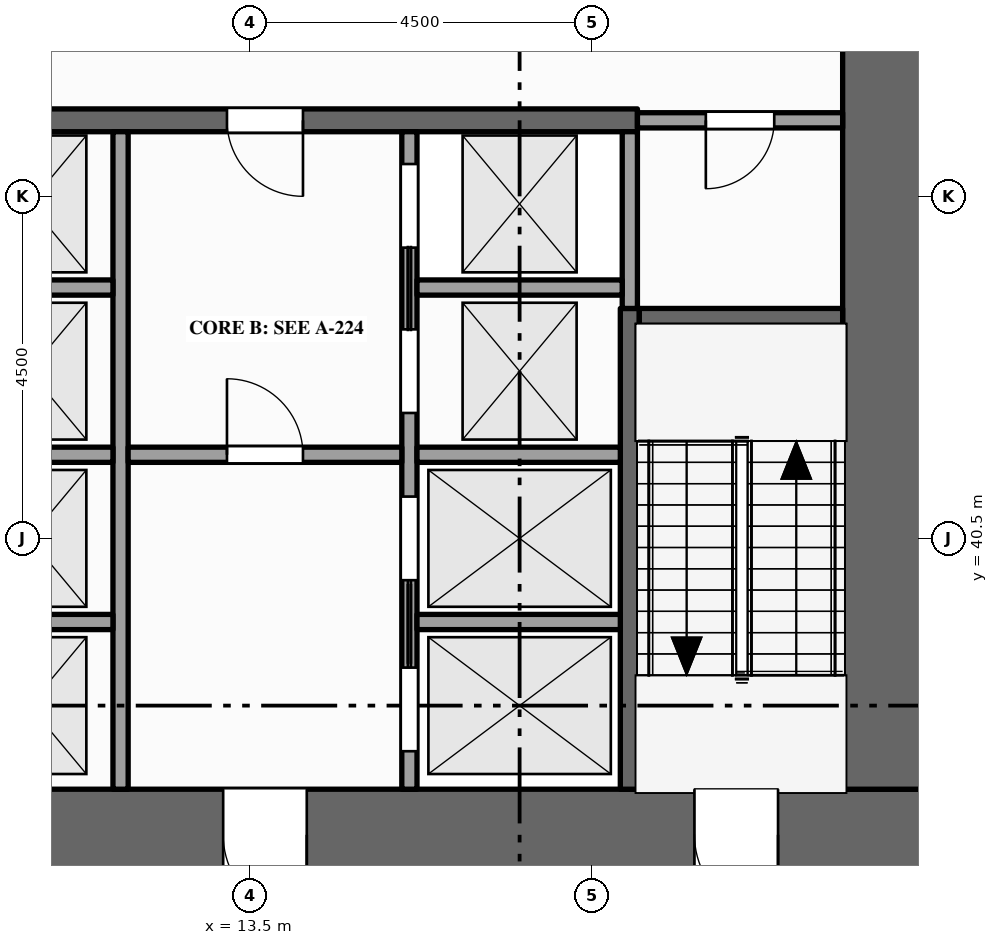
"""IFC4 building model, lengths in metres.
Left out: names, types, materials, properties, quantities, classifications, styles, units other than length and angle.
Written with IfcOpenShell. Run it as: python <this file> out.ifc"""

import sys

from ifc_helpers import new_model, si_unit, direction, frame, frame_2d, origin, place, context, subcontext, project, spatial, rectangle, extrude, element, fill, save


model = new_model("IFC4")
c1 = context("Model", 3, precision=1e-05, world=origin(), true_north=direction((0.0, 1.0)))
c2 = subcontext(c1, "Body", "Model", "MODEL_VIEW")
j1 = project(units=[si_unit("LENGTHUNIT", "METRE"), si_unit("PLANEANGLEUNIT", "RADIAN")], contexts=[c1])
p1 = place(None, origin())
s1 = spatial("IfcSite", under=j1, at=p1, CompositionType="ELEMENT")
p2 = place(p1, origin())
s2 = spatial("IfcBuilding", under=s1, at=p2, CompositionType="ELEMENT")
p3 = place(p2, frame((0.0, 0.0, 131.0)))
s3 = spatial("IfcBuildingStorey", under=s2, at=p3, CompositionType="ELEMENT", Elevation=131.0)
p4 = place(p3, frame((0.0, 36.6, -0.15), z_axis=(0.0, 0.0, 1.0), x_axis=(1.0, 0.0, 0.0)))
e1 = element("IfcWall", 1, at=p4, inside=s3, PredefinedType="SHEAR", context=c2, shape_type="SweptSolid", body=[
    extrude(rectangle(XDim=22.5, YDim=1.2, at=frame_2d((11.25, 0.0))), origin(), (0.0, 0.0, 1.0), 8.0),
])
p5 = place(p4, frame((7.1, 0.0, 0.15)))
e2 = element("IfcOpeningElement", 2, at=p5, cuts=e1, PredefinedType="OPENING", context=c2, shape_type="SweptSolid", body=[
    extrude(rectangle(XDim=1.8, YDim=2.1, at=frame_2d((0.9, 1.05))), frame((0.0, 0.61, 0.0), z_axis=(0.0, -1.0, 0.0), x_axis=(1.0, 0.0, 0.0)), (0.0, 0.0, 1.0), 1.22),
])
p6 = place(p4, frame((13.15, 0.0, 0.15)))
e3 = element("IfcOpeningElement", 3, at=p6, cuts=e1, PredefinedType="OPENING", context=c2, shape_type="SweptSolid", body=[
    extrude(rectangle(XDim=1.1, YDim=2.1, at=frame_2d((0.55, 1.05))), frame((0.0, 0.61, 0.0), z_axis=(0.0, -1.0, 0.0), x_axis=(1.0, 0.0, 0.0)), (0.0, 0.0, 1.0), 1.22),
])
p7 = place(p4, frame((2.15, 0.0, 0.15)))
e4 = element("IfcOpeningElement", 4, at=p7, cuts=e1, PredefinedType="OPENING", context=c2, shape_type="SweptSolid", body=[
    extrude(rectangle(XDim=1.1, YDim=2.1, at=frame_2d((0.55, 1.05))), frame((0.0, 0.61, 0.0), z_axis=(0.0, -1.0, 0.0), x_axis=(1.0, 0.0, 0.0)), (0.0, 0.0, 1.0), 1.22),
])
p8 = place(p4, frame((19.35, 0.0, 0.15)))
e5 = element("IfcOpeningElement", 5, at=p8, cuts=e1, PredefinedType="OPENING", context=c2, shape_type="SweptSolid", body=[
    extrude(rectangle(XDim=1.1, YDim=2.1, at=frame_2d((0.55, 1.05))), frame((0.0, 0.61, 0.0), z_axis=(0.0, -1.0, 0.0), x_axis=(1.0, 0.0, 0.0)), (0.0, 0.0, 1.0), 1.22),
])
p9 = place(p3, frame((21.9, 37.2, -0.15), z_axis=(0.0, 0.0, 1.0), x_axis=(0.0, 1.0, 0.0)))
e6 = element("IfcWall", 6, at=p9, inside=s3, PredefinedType="SHEAR", context=c2, shape_type="SweptSolid", body=[
    extrude(rectangle(XDim=11.1, YDim=1.2, at=frame_2d((5.55, 0.0))), origin(), (0.0, 0.0, 1.0), 8.0),
])
p10 = place(p3, frame((11.8, 37.2, 0.0), z_axis=(0.0, 0.0, 1.0), x_axis=(0.0, 1.0, 0.0)))
e7 = element("IfcWall", 7, at=p10, inside=s3, PredefinedType="SOLIDWALL", context=c2, shape_type="SweptSolid", body=[
    extrude(rectangle(XDim=8.65, YDim=0.2, at=frame_2d((4.325, 0.0))), origin(), (0.0, 0.0, 1.0), 7.85),
])
p11 = place(p3, frame((15.6, 37.2, 0.0), z_axis=(0.0, 0.0, 1.0), x_axis=(0.0, 1.0, 0.0)))
e8 = element("IfcWall", 8, at=p11, inside=s3, PredefinedType="SOLIDWALL", context=c2, shape_type="SweptSolid", body=[
    extrude(rectangle(XDim=8.65, YDim=0.2, at=frame_2d((4.325, 0.0))), origin(), (0.0, 0.0, 1.0), 7.85),
])
p12 = place(p11, frame((0.5, 0.0, 0.012)))
e9 = element("IfcOpeningElement", 9, at=p12, cuts=e8, PredefinedType="OPENING", context=c2, shape_type="SweptSolid", body=[
    extrude(rectangle(XDim=1.1, YDim=2.1, at=frame_2d((0.55, 1.05))), frame((0.0, 0.11, 0.0), z_axis=(0.0, -1.0, 0.0), x_axis=(1.0, 0.0, 0.0)), (0.0, 0.0, 1.0), 0.22),
])
p13 = place(p11, frame((2.75, 0.0, 0.012)))
e10 = element("IfcOpeningElement", 10, at=p13, cuts=e8, PredefinedType="OPENING", context=c2, shape_type="SweptSolid", body=[
    extrude(rectangle(XDim=1.1, YDim=2.1, at=frame_2d((0.55, 1.05))), frame((0.0, 0.11, 0.0), z_axis=(0.0, -1.0, 0.0), x_axis=(1.0, 0.0, 0.0)), (0.0, 0.0, 1.0), 0.22),
])
p14 = place(p11, frame((4.95, 0.0, 0.012)))
e11 = element("IfcOpeningElement", 11, at=p14, cuts=e8, PredefinedType="OPENING", context=c2, shape_type="SweptSolid", body=[
    extrude(rectangle(XDim=1.1, YDim=2.1, at=frame_2d((0.55, 1.05))), frame((0.0, 0.11, 0.0), z_axis=(0.0, -1.0, 0.0), x_axis=(1.0, 0.0, 0.0)), (0.0, 0.0, 1.0), 0.22),
])
p15 = place(p11, frame((7.125, 0.0, 0.012)))
e12 = element("IfcOpeningElement", 12, at=p15, cuts=e8, PredefinedType="OPENING", context=c2, shape_type="SweptSolid", body=[
    extrude(rectangle(XDim=1.1, YDim=2.1, at=frame_2d((0.55, 1.05))), frame((0.0, 0.11, 0.0), z_axis=(0.0, -1.0, 0.0), x_axis=(1.0, 0.0, 0.0)), (0.0, 0.0, 1.0), 0.22),
])
p16 = place(p3, frame((18.5, 37.2, 0.0), z_axis=(0.0, 0.0, 1.0), x_axis=(0.0, 1.0, 0.0)))
e13 = element("IfcWall", 13, at=p16, inside=s3, PredefinedType="SHEAR", context=c2, shape_type="SweptSolid", body=[
    extrude(rectangle(XDim=6.325, YDim=0.25, at=frame_2d((3.163, 0.0))), origin(), (0.0, 0.0, 1.0), 7.85),
])
p17 = place(p3, frame((18.5, 43.525, 0.0), z_axis=(0.0, 0.0, 1.0), x_axis=(0.0, 1.0, 0.0)))
e14 = element("IfcWall", 14, at=p17, inside=s3, PredefinedType="SOLIDWALL", context=c2, shape_type="SweptSolid", body=[
    extrude(rectangle(XDim=2.325, YDim=0.2, at=frame_2d((1.163, 0.0))), origin(), (0.0, 0.0, 1.0), 7.85),
])
p18 = place(p3, frame((9.5, 39.4, 0.0), z_axis=(0.0, 0.0, 1.0), x_axis=(1.0, 0.0, 0.0)))
e15 = element("IfcWall", 15, at=p18, inside=s3, PredefinedType="SOLIDWALL", context=c2, shape_type="SweptSolid", body=[
    extrude(rectangle(XDim=2.2, YDim=0.2, at=frame_2d((1.1, 0.0))), origin(), (0.0, 0.0, 1.0), 7.85),
])
p19 = place(p3, frame((15.7, 39.4, 0.0), z_axis=(0.0, 0.0, 1.0), x_axis=(1.0, 0.0, 0.0)))
e16 = element("IfcWall", 16, at=p19, inside=s3, PredefinedType="SOLIDWALL", context=c2, shape_type="SweptSolid", body=[
    extrude(rectangle(XDim=2.675, YDim=0.2, at=frame_2d((1.337, 0.0))), origin(), (0.0, 0.0, 1.0), 7.85),
])
p20 = place(p3, frame((9.5, 41.6, 0.0), z_axis=(0.0, 0.0, 1.0), x_axis=(1.0, 0.0, 0.0)))
e17 = element("IfcWall", 17, at=p20, inside=s3, PredefinedType="SOLIDWALL", context=c2, shape_type="SweptSolid", body=[
    extrude(rectangle(XDim=2.2, YDim=0.2, at=frame_2d((1.1, 0.0))), origin(), (0.0, 0.0, 1.0), 7.85),
])
p21 = place(p3, frame((11.9, 41.6, 0.0), z_axis=(0.0, 0.0, 1.0), x_axis=(1.0, 0.0, 0.0)))
e18 = element("IfcWall", 18, at=p21, inside=s3, PredefinedType="PARTITIONING", context=c2, shape_type="SweptSolid", body=[
    extrude(rectangle(XDim=3.6, YDim=0.2, at=frame_2d((1.8, 0.0))), origin(), (0.0, 0.0, 1.0), 7.85),
])
p22 = place(p21, frame((1.3, 0.0, 0.0)))
e19 = element("IfcOpeningElement", 19, at=p22, cuts=e18, PredefinedType="OPENING", context=c2, shape_type="SweptSolid", body=[
    extrude(rectangle(XDim=1.0, YDim=2.1, at=frame_2d((0.5, 1.05))), frame((0.0, 0.11, 0.0), z_axis=(0.0, -1.0, 0.0), x_axis=(1.0, 0.0, 0.0)), (0.0, 0.0, 1.0), 0.22),
])
p23 = place(p3, frame((15.7, 41.6, 0.0), z_axis=(0.0, 0.0, 1.0), x_axis=(1.0, 0.0, 0.0)))
e20 = element("IfcWall", 20, at=p23, inside=s3, PredefinedType="SOLIDWALL", context=c2, shape_type="SweptSolid", body=[
    extrude(rectangle(XDim=2.675, YDim=0.2, at=frame_2d((1.337, 0.0))), origin(), (0.0, 0.0, 1.0), 7.85),
])
p24 = place(p3, frame((18.625, 43.4, 0.0), z_axis=(0.0, 0.0, 1.0), x_axis=(1.0, 0.0, 0.0)))
e21 = element("IfcWall", 21, at=p24, inside=s3, PredefinedType="SHEAR", context=c2, shape_type="SweptSolid", body=[
    extrude(rectangle(XDim=2.675, YDim=0.25, at=frame_2d((1.337, 0.0))), origin(), (0.0, 0.0, 1.0), 7.85),
])
p25 = place(p3, frame((9.5, 43.8, 0.0), z_axis=(0.0, 0.0, 1.0), x_axis=(1.0, 0.0, 0.0)))
e22 = element("IfcWall", 22, at=p25, inside=s3, PredefinedType="SOLIDWALL", context=c2, shape_type="SweptSolid", body=[
    extrude(rectangle(XDim=2.2, YDim=0.2, at=frame_2d((1.1, 0.0))), origin(), (0.0, 0.0, 1.0), 7.85),
])
p26 = place(p3, frame((15.7, 43.8, 0.0), z_axis=(0.0, 0.0, 1.0), x_axis=(1.0, 0.0, 0.0)))
e23 = element("IfcWall", 23, at=p26, inside=s3, PredefinedType="SOLIDWALL", context=c2, shape_type="SweptSolid", body=[
    extrude(rectangle(XDim=2.7, YDim=0.2, at=frame_2d((1.35, 0.0))), origin(), (0.0, 0.0, 1.0), 7.85),
])
p27 = place(p3, frame((4.1, 46.0, 0.0), z_axis=(0.0, 0.0, 1.0), x_axis=(1.0, 0.0, 0.0)))
e24 = element("IfcWall", 24, at=p27, inside=s3, PredefinedType="SHEAR", context=c2, shape_type="SweptSolid", body=[
    extrude(rectangle(XDim=14.5, YDim=0.3, at=frame_2d((7.25, 0.0))), origin(), (0.0, 0.0, 1.0), 7.85),
])
p28 = place(p27, frame((3.4, 0.0, 0.0)))
e25 = element("IfcOpeningElement", 25, at=p28, cuts=e24, PredefinedType="OPENING", context=c2, shape_type="SweptSolid", body=[
    extrude(rectangle(XDim=1.0, YDim=2.1, at=frame_2d((0.5, 1.05))), frame((0.0, 0.16, 0.0), z_axis=(0.0, -1.0, 0.0), x_axis=(1.0, 0.0, 0.0)), (0.0, 0.0, 1.0), 0.32),
])
p29 = place(p27, frame((9.1, 0.0, 0.0)))
e26 = element("IfcOpeningElement", 26, at=p29, cuts=e24, PredefinedType="OPENING", context=c2, shape_type="SweptSolid", body=[
    extrude(rectangle(XDim=1.0, YDim=2.1, at=frame_2d((0.5, 1.05))), frame((0.0, 0.16, 0.0), z_axis=(0.0, -1.0, 0.0), x_axis=(1.0, 0.0, 0.0)), (0.0, 0.0, 1.0), 0.32),
])
p30 = place(p3, frame((18.6, 46.0, 0.0), z_axis=(0.0, 0.0, 1.0), x_axis=(1.0, 0.0, 0.0)))
e27 = element("IfcWall", 27, at=p30, inside=s3, PredefinedType="PARTITIONING", context=c2, shape_type="SweptSolid", body=[
    extrude(rectangle(XDim=2.7, YDim=0.2, at=frame_2d((1.35, 0.0))), origin(), (0.0, 0.0, 1.0), 7.85),
])
p31 = place(p30, frame((0.9, 0.0, 0.0)))
e28 = element("IfcOpeningElement", 28, at=p31, cuts=e27, PredefinedType="OPENING", context=c2, shape_type="SweptSolid", body=[
    extrude(rectangle(XDim=0.9, YDim=2.1, at=frame_2d((0.45, 1.05))), frame((0.0, 0.11, 0.0), z_axis=(0.0, -1.0, 0.0), x_axis=(1.0, 0.0, 0.0)), (0.0, 0.0, 1.0), 0.22),
])
p32 = place(p12, origin())
e29 = element("IfcDoor", 29, at=p32, inside=s3, OperationType="SLIDING_TO_RIGHT", PredefinedType="DOOR", context=c2, shape_type="SweptSolid", body=[
    extrude(rectangle(XDim=1.1, YDim=2.1, at=frame_2d((0.55, 1.05))), frame((0.0, 0.025, 0.0), z_axis=(0.0, -1.0, 0.0), x_axis=(1.0, 0.0, 0.0)), (0.0, 0.0, 1.0), 0.05),
])
fill(e9, e29)
p33 = place(p13, origin())
e30 = element("IfcDoor", 30, at=p33, inside=s3, OperationType="SLIDING_TO_LEFT", PredefinedType="DOOR", context=c2, shape_type="SweptSolid", body=[
    extrude(rectangle(XDim=1.1, YDim=2.1, at=frame_2d((0.55, 1.05))), frame((0.0, 0.025, 0.0), z_axis=(0.0, -1.0, 0.0), x_axis=(1.0, 0.0, 0.0)), (0.0, 0.0, 1.0), 0.05),
])
fill(e10, e30)
p34 = place(p14, origin())
e31 = element("IfcDoor", 31, at=p34, inside=s3, OperationType="SLIDING_TO_RIGHT", PredefinedType="DOOR", context=c2, shape_type="SweptSolid", body=[
    extrude(rectangle(XDim=1.1, YDim=2.1, at=frame_2d((0.55, 1.05))), frame((0.0, 0.025, 0.0), z_axis=(0.0, -1.0, 0.0), x_axis=(1.0, 0.0, 0.0)), (0.0, 0.0, 1.0), 0.05),
])
fill(e11, e31)
p35 = place(p15, origin())
e32 = element("IfcDoor", 32, at=p35, inside=s3, OperationType="SLIDING_TO_LEFT", PredefinedType="DOOR", context=c2, shape_type="SweptSolid", body=[
    extrude(rectangle(XDim=1.1, YDim=2.1, at=frame_2d((0.55, 1.05))), frame((0.0, 0.025, 0.0), z_axis=(0.0, -1.0, 0.0), x_axis=(1.0, 0.0, 0.0)), (0.0, 0.0, 1.0), 0.05),
])
fill(e12, e32)
p36 = place(p6, origin())
e33 = element("IfcDoor", 33, at=p36, inside=s3, OperationType="SINGLE_SWING_RIGHT", PredefinedType="DOOR", context=c2, shape_type="SweptSolid", body=[
    extrude(rectangle(XDim=1.1, YDim=2.1, at=frame_2d((0.55, 1.05))), frame((0.0, 0.025, 0.0), z_axis=(0.0, -1.0, 0.0), x_axis=(1.0, 0.0, 0.0)), (0.0, 0.0, 1.0), 0.05),
])
fill(e3, e33)
p37 = place(p22, origin())
e34 = element("IfcDoor", 34, at=p37, inside=s3, OperationType="SINGLE_SWING_LEFT", PredefinedType="DOOR", context=c2, shape_type="SweptSolid", body=[
    extrude(rectangle(XDim=1.0, YDim=2.1, at=frame_2d((0.5, 1.05))), frame((0.0, 0.025, 0.0), z_axis=(0.0, -1.0, 0.0), x_axis=(1.0, 0.0, 0.0)), (0.0, 0.0, 1.0), 0.05),
])
fill(e19, e34)
p38 = place(p29, origin())
e35 = element("IfcDoor", 35, at=p38, inside=s3, OperationType="SINGLE_SWING_RIGHT", PredefinedType="DOOR", context=c2, shape_type="SweptSolid", body=[
    extrude(rectangle(XDim=1.0, YDim=2.1, at=frame_2d((0.5, 1.05))), frame((0.0, 0.025, 0.0), z_axis=(0.0, -1.0, 0.0), x_axis=(1.0, 0.0, 0.0)), (0.0, 0.0, 1.0), 0.05),
])
fill(e26, e35)
p39 = place(p8, origin())
e36 = element("IfcDoor", 36, at=p39, inside=s3, OperationType="SINGLE_SWING_RIGHT", PredefinedType="DOOR", context=c2, shape_type="SweptSolid", body=[
    extrude(rectangle(XDim=1.1, YDim=2.1, at=frame_2d((0.55, 1.05))), frame((0.0, 0.025, 0.0), z_axis=(0.0, -1.0, 0.0), x_axis=(1.0, 0.0, 0.0)), (0.0, 0.0, 1.0), 0.05),
])
fill(e5, e36)
p40 = place(p31, origin())
e37 = element("IfcDoor", 37, at=p40, inside=s3, OperationType="SINGLE_SWING_LEFT", PredefinedType="DOOR", context=c2, shape_type="SweptSolid", body=[
    extrude(rectangle(XDim=0.9, YDim=2.1, at=frame_2d((0.45, 1.05))), frame((0.0, 0.025, 0.0), z_axis=(0.0, -1.0, 0.0), x_axis=(1.0, 0.0, 0.0)), (0.0, 0.0, 1.0), 0.05),
])
fill(e28, e37)
save(model, sys.argv[1])
